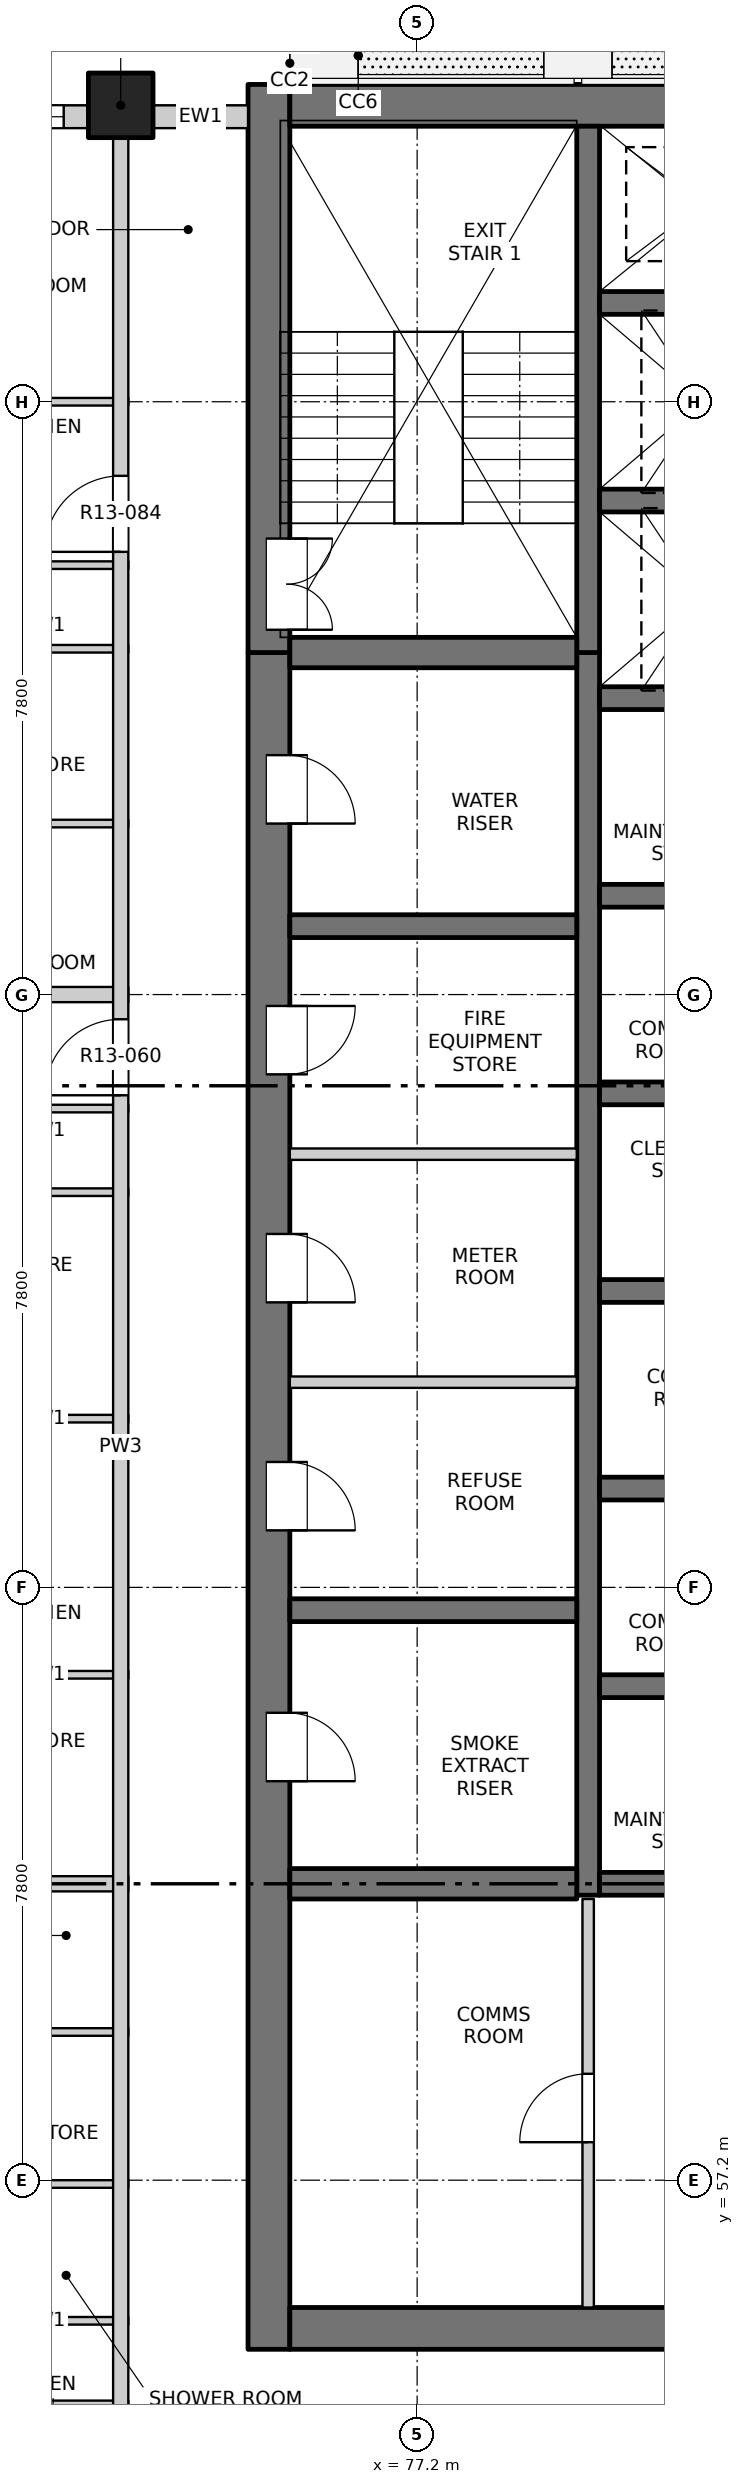
"""IFC4 building model, lengths in metres.
Left out: names, types, materials, properties, quantities, classifications, styles, units other than length and angle.
Written with IfcOpenShell. Run it as: python <this file> out.ifc"""

import sys

from ifc_helpers import new_model, si_unit, direction, frame, frame_2d, origin, origin_2d, place, context, subcontext, project, spatial, rectangle, extrude, element, fill, save


model = new_model("IFC4")
c1 = context("Model", 3, precision=1e-05, world=origin(), true_north=direction((0.0, 1.0)))
c2 = subcontext(c1, "Body", "Model", "MODEL_VIEW")
j1 = project(units=[si_unit("LENGTHUNIT", "METRE"), si_unit("PLANEANGLEUNIT", "RADIAN")], contexts=[c1])
p1 = place(None, origin())
s1 = spatial("IfcSite", under=j1, at=p1, CompositionType="ELEMENT")
p2 = place(p1, origin())
s2 = spatial("IfcBuilding", under=s1, at=p2, CompositionType="ELEMENT")
p3 = place(p2, frame((0.0, 0.0, 140.7)))
s3 = spatial("IfcBuildingStorey", under=s2, at=p3, CompositionType="ELEMENT", Elevation=140.7)
p4 = place(p3, frame((73.3, 84.5, -0.25), z_axis=(0.0, 0.0, 1.0), x_axis=(1.0, 0.0, 0.0)))
e1 = element("IfcColumn", 1, at=p4, inside=s3, PredefinedType="COLUMN", context=c2, shape_type="SweptSolid", body=[
    extrude(rectangle(XDim=0.85, YDim=0.85, at=origin_2d()), origin(), (0.0, 0.0, 1.0), 3.35),
])
p5 = place(p3, frame((75.25, 54.975, -0.25), z_axis=(0.0, 0.0, 1.0), x_axis=(0.0, 1.0, 0.0)))
e2 = element("IfcWall", 2, at=p5, inside=s3, PredefinedType="SOLIDWALL", context=c2, shape_type="SweptSolid", body=[
    extrude(rectangle(XDim=22.325, YDim=0.55, at=frame_2d((11.163, 0.0))), origin(), (0.0, 0.0, 1.0), 3.35),
])
p6 = place(p5, frame((7.475, 0.0, 0.25)))
e3 = element("IfcOpeningElement", 3, at=p6, cuts=e2, PredefinedType="OPENING", context=c2, shape_type="SweptSolid", body=[
    extrude(rectangle(XDim=0.9, YDim=2.1, at=frame_2d((0.45, 1.05))), frame((0.0, 0.285, 0.0), z_axis=(0.0, -1.0, 0.0), x_axis=(1.0, 0.0, 0.0)), (0.0, 0.0, 1.0), 0.57),
])
p7 = place(p5, frame((10.775, 0.0, 0.25)))
e4 = element("IfcOpeningElement", 4, at=p7, cuts=e2, PredefinedType="OPENING", context=c2, shape_type="SweptSolid", body=[
    extrude(rectangle(XDim=0.9, YDim=2.1, at=frame_2d((0.45, 1.05))), frame((0.0, 0.285, 0.0), z_axis=(0.0, -1.0, 0.0), x_axis=(1.0, 0.0, 0.0)), (0.0, 0.0, 1.0), 0.57),
])
p8 = place(p5, frame((13.775, 0.0, 0.25)))
e5 = element("IfcOpeningElement", 5, at=p8, cuts=e2, PredefinedType="OPENING", context=c2, shape_type="SweptSolid", body=[
    extrude(rectangle(XDim=0.9, YDim=2.1, at=frame_2d((0.45, 1.05))), frame((0.0, 0.285, 0.0), z_axis=(0.0, -1.0, 0.0), x_axis=(1.0, 0.0, 0.0)), (0.0, 0.0, 1.0), 0.57),
])
p9 = place(p5, frame((16.775, 0.0, 0.25)))
e6 = element("IfcOpeningElement", 6, at=p9, cuts=e2, PredefinedType="OPENING", context=c2, shape_type="SweptSolid", body=[
    extrude(rectangle(XDim=0.9, YDim=2.1, at=frame_2d((0.45, 1.05))), frame((0.0, 0.285, 0.0), z_axis=(0.0, -1.0, 0.0), x_axis=(1.0, 0.0, 0.0)), (0.0, 0.0, 1.0), 0.57),
])
p10 = place(p5, frame((20.075, 0.0, 0.25)))
e7 = element("IfcOpeningElement", 7, at=p10, cuts=e2, PredefinedType="OPENING", context=c2, shape_type="SweptSolid", body=[
    extrude(rectangle(XDim=0.9, YDim=2.1, at=frame_2d((0.45, 1.05))), frame((0.0, 0.285, 0.0), z_axis=(0.0, -1.0, 0.0), x_axis=(1.0, 0.0, 0.0)), (0.0, 0.0, 1.0), 0.57),
])
p11 = place(p3, frame((75.25, 77.3, -0.25), z_axis=(0.0, 0.0, 1.0), x_axis=(0.0, 1.0, 0.0)))
e8 = element("IfcWall", 8, at=p11, inside=s3, PredefinedType="SOLIDWALL", context=c2, shape_type="SweptSolid", body=[
    extrude(rectangle(XDim=7.475, YDim=0.55, at=frame_2d((3.737, 0.0))), origin(), (0.0, 0.0, 1.0), 3.35),
])
p12 = place(p11, frame((0.3, 0.0, 0.25)))
e9 = element("IfcOpeningElement", 9, at=p12, cuts=e8, PredefinedType="OPENING", context=c2, shape_type="SweptSolid", body=[
    extrude(rectangle(XDim=1.2, YDim=2.1, at=frame_2d((0.6, 1.05))), frame((0.0, 0.285, 0.0), z_axis=(0.0, -1.0, 0.0), x_axis=(1.0, 0.0, 0.0)), (0.0, 0.0, 1.0), 0.57),
])
p13 = place(p3, frame((75.525, 55.25, -0.25), z_axis=(0.0, 0.0, 1.0), x_axis=(1.0, 0.0, 0.0)))
e10 = element("IfcWall", 10, at=p13, inside=s3, PredefinedType="SOLIDWALL", context=c2, shape_type="SweptSolid", body=[
    extrude(rectangle(XDim=18.95, YDim=0.55, at=frame_2d((9.475, 0.0))), origin(), (0.0, 0.0, 1.0), 3.35),
])
p14 = place(p13, frame((8.725, 0.0, 0.25)))
e11 = element("IfcOpeningElement", 11, at=p14, cuts=e10, PredefinedType="OPENING", context=c2, shape_type="SweptSolid", body=[
    extrude(rectangle(XDim=1.5, YDim=2.1, at=frame_2d((0.75, 1.05))), frame((0.0, 0.285, 0.0), z_axis=(0.0, -1.0, 0.0), x_axis=(1.0, 0.0, 0.0)), (0.0, 0.0, 1.0), 0.57),
])
p15 = place(p3, frame((75.525, 84.5, -0.25), z_axis=(0.0, 0.0, 1.0), x_axis=(1.0, 0.0, 0.0)))
e12 = element("IfcWall", 12, at=p15, inside=s3, PredefinedType="SOLIDWALL", context=c2, shape_type="SweptSolid", body=[
    extrude(rectangle(XDim=18.95, YDim=0.55, at=frame_2d((9.475, 0.0))), origin(), (0.0, 0.0, 1.0), 3.35),
])
p16 = place(p3, frame((79.45, 60.95, -0.25), z_axis=(0.0, 0.0, 1.0), x_axis=(0.0, 1.0, 0.0)))
e13 = element("IfcWall", 13, at=p16, inside=s3, PredefinedType="SOLIDWALL", context=c2, shape_type="SweptSolid", body=[
    extrude(rectangle(XDim=16.35, YDim=0.3, at=frame_2d((8.175, 0.0))), origin(), (0.0, 0.0, 1.0), 3.35),
])
p17 = place(p3, frame((79.45, 77.3, -0.25), z_axis=(0.0, 0.0, 1.0), x_axis=(0.0, 1.0, 0.0)))
e14 = element("IfcWall", 14, at=p17, inside=s3, PredefinedType="SOLIDWALL", context=c2, shape_type="SweptSolid", body=[
    extrude(rectangle(XDim=6.925, YDim=0.3, at=frame_2d((3.462, 0.0))), origin(), (0.0, 0.0, 1.0), 3.35),
])
for number, where, z_axis, x_axis in (
    (15, (79.6, 61.1, -0.25), (0.0, 0.0, 1.0), (1.0, 0.0, 0.0)),
    (16, (79.6, 63.7, -0.25), (0.0, 0.0, 1.0), (1.0, 0.0, 0.0)),
    (17, (79.6, 66.3, -0.25), (0.0, 0.0, 1.0), (1.0, 0.0, 0.0)),
    (18, (79.6, 68.9, -0.25), (0.0, 0.0, 1.0), (1.0, 0.0, 0.0)),
    (19, (79.6, 71.5, -0.25), (0.0, 0.0, 1.0), (1.0, 0.0, 0.0)),
    (20, (79.6, 74.1, -0.25), (0.0, 0.0, 1.0), (1.0, 0.0, 0.0)),
    (21, (79.6, 76.7, -0.25), (0.0, 0.0, 1.0), (1.0, 0.0, 0.0)),
    (22, (79.6, 79.3, -0.25), (0.0, 0.0, 1.0), (1.0, 0.0, 0.0)),
    (23, (79.6, 81.9, -0.25), (0.0, 0.0, 1.0), (1.0, 0.0, 0.0)),
):
    element("IfcWall", number, at=place(p3, frame(where, z_axis=z_axis, x_axis=x_axis)), inside=s3, PredefinedType="SOLIDWALL", context=c2, shape_type="SweptSolid", body=[
        extrude(rectangle(XDim=3.0, YDim=0.3, at=frame_2d((1.5, 0.0))), origin(), (0.0, 0.0, 1.0), 3.35),
    ])
p18 = place(p3, frame((75.525, 61.1, -0.25), z_axis=(0.0, 0.0, 1.0), x_axis=(1.0, 0.0, 0.0)))
e24 = element("IfcWall", 24, at=p18, inside=s3, PredefinedType="SOLIDWALL", context=c2, shape_type="SweptSolid", body=[
    extrude(rectangle(XDim=3.775, YDim=0.4, at=frame_2d((1.888, 0.0))), origin(), (0.0, 0.0, 1.0), 3.35),
])
for number, where, z_axis, x_axis in (
    (25, (75.525, 64.7, -0.25), (0.0, 0.0, 1.0), (1.0, 0.0, 0.0)),
    (26, (75.525, 73.7, -0.25), (0.0, 0.0, 1.0), (1.0, 0.0, 0.0)),
):
    element("IfcWall", number, at=place(p3, frame(where, z_axis=z_axis, x_axis=x_axis)), inside=s3, PredefinedType="SOLIDWALL", context=c2, shape_type="SweptSolid", body=[
        extrude(rectangle(XDim=3.775, YDim=0.3, at=frame_2d((1.888, 0.0))), origin(), (0.0, 0.0, 1.0), 3.35),
    ])
p19 = place(p3, frame((75.525, 77.3, -0.25), z_axis=(0.0, 0.0, 1.0), x_axis=(1.0, 0.0, 0.0)))
e27 = element("IfcWall", 27, at=p19, inside=s3, PredefinedType="SOLIDWALL", context=c2, shape_type="SweptSolid", body=[
    extrude(rectangle(XDim=3.775, YDim=0.4, at=frame_2d((1.888, 0.0))), origin(), (0.0, 0.0, 1.0), 3.35),
])
p20 = place(p3, frame((69.4, 84.35, 0.0), z_axis=(0.0, 0.0, 1.0), x_axis=(1.0, 0.0, 0.0)))
e28 = element("IfcWall", 28, at=p20, inside=s3, PredefinedType="SOLIDWALL", context=c2, shape_type="SweptSolid", body=[
    extrude(rectangle(XDim=3.475, YDim=0.3, at=frame_2d((1.738, 0.0))), origin(), (0.0, 0.0, 1.0), 3.1),
])
p21 = place(p20, frame((0.75, 0.0, 0.9)))
e29 = element("IfcOpeningElement", 29, at=p21, cuts=e28, PredefinedType="OPENING", context=c2, shape_type="SweptSolid", body=[
    extrude(rectangle(XDim=2.4, YDim=1.8, at=frame_2d((1.2, 0.9))), frame((0.0, 0.16, 0.0), z_axis=(0.0, -1.0, 0.0), x_axis=(1.0, 0.0, 0.0)), (0.0, 0.0, 1.0), 0.32),
])
p22 = place(p3, frame((73.725, 84.35, 0.0), z_axis=(0.0, 0.0, 1.0), x_axis=(1.0, 0.0, 0.0)))
e30 = element("IfcWall", 30, at=p22, inside=s3, PredefinedType="SOLIDWALL", context=c2, shape_type="SweptSolid", body=[
    extrude(rectangle(XDim=1.25, YDim=0.3, at=frame_2d((0.625, 0.0))), origin(), (0.0, 0.0, 1.0), 3.1),
])
for number, where, z_axis, x_axis in (
    (31, (71.18, 54.25, 0.0), (0.0, 0.0, 1.0), (1.0, 0.0, 0.0)),
    (32, (71.18, 55.35, 0.0), (0.0, 0.0, 1.0), (1.0, 0.0, 0.0)),
    (33, (71.18, 57.15, 0.0), (0.0, 0.0, 1.0), (1.0, 0.0, 0.0)),
    (34, (71.18, 59.15, 0.0), (0.0, 0.0, 1.0), (1.0, 0.0, 0.0)),
):
    element("IfcWall", number, at=place(p3, frame(where, z_axis=z_axis, x_axis=x_axis)), inside=s3, PredefinedType="PARTITIONING", context=c2, shape_type="SweptSolid", body=[
        extrude(rectangle(XDim=2.22, YDim=0.1, at=frame_2d((1.11, 0.0))), origin(), (0.0, 0.0, 1.0), 3.1),
    ])
p23 = place(p3, frame((65.8, 61.1, 0.0), z_axis=(0.0, 0.0, 1.0), x_axis=(1.0, 0.0, 0.0)))
e35 = element("IfcWall", 35, at=p23, inside=s3, PredefinedType="PARTITIONING", context=c2, shape_type="SweptSolid", body=[
    extrude(rectangle(XDim=7.6, YDim=0.2, at=frame_2d((3.8, 0.0))), origin(), (0.0, 0.0, 1.0), 3.1),
])
for number, where, z_axis, x_axis in (
    (36, (71.18, 63.85, 0.0), (0.0, 0.0, 1.0), (1.0, 0.0, 0.0)),
    (37, (71.18, 67.22, 0.0), (0.0, 0.0, 1.0), (1.0, 0.0, 0.0)),
):
    element("IfcWall", number, at=place(p3, frame(where, z_axis=z_axis, x_axis=x_axis)), inside=s3, PredefinedType="PARTITIONING", context=c2, shape_type="SweptSolid", body=[
        extrude(rectangle(XDim=2.22, YDim=0.1, at=frame_2d((1.11, 0.0))), origin(), (0.0, 0.0, 1.0), 3.1),
    ])
p24 = place(p3, frame((75.525, 67.7, 0.0), z_axis=(0.0, 0.0, 1.0), x_axis=(1.0, 0.0, 0.0)))
e38 = element("IfcWall", 38, at=p24, inside=s3, PredefinedType="PARTITIONING", context=c2, shape_type="SweptSolid", body=[
    extrude(rectangle(XDim=3.775, YDim=0.15, at=frame_2d((1.887, 0.0))), origin(), (0.0, 0.0, 1.0), 3.1),
])
p25 = place(p3, frame((71.18, 70.2, 0.0), z_axis=(0.0, 0.0, 1.0), x_axis=(1.0, 0.0, 0.0)))
e39 = element("IfcWall", 39, at=p25, inside=s3, PredefinedType="PARTITIONING", context=c2, shape_type="SweptSolid", body=[
    extrude(rectangle(XDim=2.22, YDim=0.1, at=frame_2d((1.11, 0.0))), origin(), (0.0, 0.0, 1.0), 3.1),
])
p26 = place(p3, frame((75.525, 70.7, 0.0), z_axis=(0.0, 0.0, 1.0), x_axis=(1.0, 0.0, 0.0)))
e40 = element("IfcWall", 40, at=p26, inside=s3, PredefinedType="PARTITIONING", context=c2, shape_type="SweptSolid", body=[
    extrude(rectangle(XDim=3.775, YDim=0.15, at=frame_2d((1.887, 0.0))), origin(), (0.0, 0.0, 1.0), 3.1),
])
p27 = place(p3, frame((71.18, 71.3, 0.0), z_axis=(0.0, 0.0, 1.0), x_axis=(1.0, 0.0, 0.0)))
e41 = element("IfcWall", 41, at=p27, inside=s3, PredefinedType="PARTITIONING", context=c2, shape_type="SweptSolid", body=[
    extrude(rectangle(XDim=2.22, YDim=0.1, at=frame_2d((1.11, 0.0))), origin(), (0.0, 0.0, 1.0), 3.1),
])
p28 = place(p3, frame((65.8, 72.8, 0.0), z_axis=(0.0, 0.0, 1.0), x_axis=(1.0, 0.0, 0.0)))
e42 = element("IfcWall", 42, at=p28, inside=s3, PredefinedType="PARTITIONING", context=c2, shape_type="SweptSolid", body=[
    extrude(rectangle(XDim=7.6, YDim=0.2, at=frame_2d((3.8, 0.0))), origin(), (0.0, 0.0, 1.0), 3.1),
])
for number, where, z_axis, x_axis in (
    (43, (71.18, 75.05, 0.0), (0.0, 0.0, 1.0), (1.0, 0.0, 0.0)),
    (44, (71.18, 77.35, 0.0), (0.0, 0.0, 1.0), (1.0, 0.0, 0.0)),
    (45, (71.18, 78.45, 0.0), (0.0, 0.0, 1.0), (1.0, 0.0, 0.0)),
):
    element("IfcWall", number, at=place(p3, frame(where, z_axis=z_axis, x_axis=x_axis)), inside=s3, PredefinedType="PARTITIONING", context=c2, shape_type="SweptSolid", body=[
        extrude(rectangle(XDim=2.22, YDim=0.1, at=frame_2d((1.11, 0.0))), origin(), (0.0, 0.0, 1.0), 3.1),
    ])
p29 = place(p3, frame((65.8, 80.6, 0.0), z_axis=(0.0, 0.0, 1.0), x_axis=(1.0, 0.0, 0.0)))
e46 = element("IfcWall", 46, at=p29, inside=s3, PredefinedType="PARTITIONING", context=c2, shape_type="SweptSolid", body=[
    extrude(rectangle(XDim=7.6, YDim=0.1, at=frame_2d((3.8, 0.0))), origin(), (0.0, 0.0, 1.0), 3.1),
])
p30 = place(p29, frame((4.19, 0.0, 0.0)))
e47 = element("IfcOpeningElement", 47, at=p30, cuts=e46, PredefinedType="OPENING", context=c2, shape_type="SweptSolid", body=[
    extrude(rectangle(XDim=0.9, YDim=2.1, at=frame_2d((0.45, 1.05))), frame((0.0, 0.06, 0.0), z_axis=(0.0, -1.0, 0.0), x_axis=(1.0, 0.0, 0.0)), (0.0, 0.0, 1.0), 0.12),
])
p31 = place(p3, frame((73.3, 49.5, 0.0), z_axis=(0.0, 0.0, 1.0), x_axis=(0.0, 1.0, 0.0)))
e48 = element("IfcWall", 48, at=p31, inside=s3, PredefinedType="PARTITIONING", context=c2, shape_type="SweptSolid", body=[
    extrude(rectangle(XDim=34.7, YDim=0.2, at=frame_2d((17.35, 0.0))), origin(), (0.0, 0.0, 1.0), 3.1),
])
p32 = place(p31, frame((3.575, 0.0, 0.0)))
e49 = element("IfcOpeningElement", 49, at=p32, cuts=e48, PredefinedType="OPENING", context=c2, shape_type="SweptSolid", body=[
    extrude(rectangle(XDim=1.0, YDim=2.1, at=frame_2d((0.5, 1.05))), frame((0.0, 0.11, 0.0), z_axis=(0.0, -1.0, 0.0), x_axis=(1.0, 0.0, 0.0)), (0.0, 0.0, 1.0), 0.22),
])
p33 = place(p31, frame((21.975, 0.0, 0.0)))
e50 = element("IfcOpeningElement", 50, at=p33, cuts=e48, PredefinedType="OPENING", context=c2, shape_type="SweptSolid", body=[
    extrude(rectangle(XDim=1.0, YDim=2.1, at=frame_2d((0.5, 1.05))), frame((0.0, 0.11, 0.0), z_axis=(0.0, -1.0, 0.0), x_axis=(1.0, 0.0, 0.0)), (0.0, 0.0, 1.0), 0.22),
])
p34 = place(p31, frame((29.125, 0.0, 0.0)))
e51 = element("IfcOpeningElement", 51, at=p34, cuts=e48, PredefinedType="OPENING", context=c2, shape_type="SweptSolid", body=[
    extrude(rectangle(XDim=1.0, YDim=2.1, at=frame_2d((0.5, 1.05))), frame((0.0, 0.11, 0.0), z_axis=(0.0, -1.0, 0.0), x_axis=(1.0, 0.0, 0.0)), (0.0, 0.0, 1.0), 0.22),
])
p35 = place(p3, frame((79.45, 55.525, 0.0), z_axis=(0.0, 0.0, 1.0), x_axis=(0.0, 1.0, 0.0)))
e52 = element("IfcWall", 52, at=p35, inside=s3, PredefinedType="PARTITIONING", context=c2, shape_type="SweptSolid", body=[
    extrude(rectangle(XDim=5.375, YDim=0.15, at=frame_2d((2.688, 0.0))), origin(), (0.0, 0.0, 1.0), 3.1),
])
p36 = place(p35, frame((2.175, 0.0, 0.0)))
e53 = element("IfcOpeningElement", 53, at=p36, cuts=e52, PredefinedType="OPENING", context=c2, shape_type="SweptSolid", body=[
    extrude(rectangle(XDim=0.9, YDim=2.1, at=frame_2d((0.45, 1.05))), frame((0.0, 0.085, 0.0), z_axis=(0.0, -1.0, 0.0), x_axis=(1.0, 0.0, 0.0)), (0.0, 0.0, 1.0), 0.17),
])
p37 = place(p21, origin())
e54 = element("IfcWindow", 54, at=p37, inside=s3, PartitioningType="DOUBLE_PANEL_VERTICAL", PredefinedType="WINDOW", context=c2, shape_type="SweptSolid", body=[
    extrude(rectangle(XDim=2.4, YDim=1.8, at=frame_2d((1.2, 0.9))), frame((0.0, 0.03, 0.0), z_axis=(0.0, -1.0, 0.0), x_axis=(1.0, 0.0, 0.0)), (0.0, 0.0, 1.0), 0.06),
])
fill(e29, e54)
p38 = place(p36, origin())
e55 = element("IfcDoor", 55, at=p38, inside=s3, OperationType="SINGLE_SWING_LEFT", PredefinedType="DOOR", context=c2, shape_type="SweptSolid", body=[
    extrude(rectangle(XDim=0.9, YDim=2.1, at=frame_2d((0.45, 1.05))), frame((0.0, 0.025, 0.0), z_axis=(0.0, -1.0, 0.0), x_axis=(1.0, 0.0, 0.0)), (0.0, 0.0, 1.0), 0.05),
])
fill(e53, e55)
p39 = place(p6, origin())
e56 = element("IfcDoor", 56, at=p39, inside=s3, OperationType="SINGLE_SWING_RIGHT", PredefinedType="DOOR", context=c2, shape_type="SweptSolid", body=[
    extrude(rectangle(XDim=0.9, YDim=2.1, at=frame_2d((0.45, 1.05))), frame((0.0, -0.21, 0.0), z_axis=(0.0, -1.0, 0.0), x_axis=(1.0, 0.0, 0.0)), (0.0, 0.0, 1.0), 0.05),
])
fill(e3, e56)
p40 = place(p7, origin())
e57 = element("IfcDoor", 57, at=p40, inside=s3, OperationType="SINGLE_SWING_RIGHT", PredefinedType="DOOR", context=c2, shape_type="SweptSolid", body=[
    extrude(rectangle(XDim=0.9, YDim=2.1, at=frame_2d((0.45, 1.05))), frame((0.0, -0.21, 0.0), z_axis=(0.0, -1.0, 0.0), x_axis=(1.0, 0.0, 0.0)), (0.0, 0.0, 1.0), 0.05),
])
fill(e4, e57)
p41 = place(p8, origin())
e58 = element("IfcDoor", 58, at=p41, inside=s3, OperationType="SINGLE_SWING_RIGHT", PredefinedType="DOOR", context=c2, shape_type="SweptSolid", body=[
    extrude(rectangle(XDim=0.9, YDim=2.1, at=frame_2d((0.45, 1.05))), frame((0.0, -0.21, 0.0), z_axis=(0.0, -1.0, 0.0), x_axis=(1.0, 0.0, 0.0)), (0.0, 0.0, 1.0), 0.05),
])
fill(e5, e58)
p42 = place(p33, origin())
e59 = element("IfcDoor", 59, at=p42, inside=s3, OperationType="SINGLE_SWING_RIGHT", PredefinedType="DOOR", context=c2, shape_type="SweptSolid", body=[
    extrude(rectangle(XDim=1.0, YDim=2.1, at=frame_2d((0.5, 1.05))), frame((0.0, 0.025, 0.0), z_axis=(0.0, -1.0, 0.0), x_axis=(1.0, 0.0, 0.0)), (0.0, 0.0, 1.0), 0.05),
])
fill(e50, e59)
p43 = place(p9, origin())
e60 = element("IfcDoor", 60, at=p43, inside=s3, OperationType="SINGLE_SWING_LEFT", PredefinedType="DOOR", context=c2, shape_type="SweptSolid", body=[
    extrude(rectangle(XDim=0.9, YDim=2.1, at=frame_2d((0.45, 1.05))), frame((0.0, -0.21, 0.0), z_axis=(0.0, -1.0, 0.0), x_axis=(1.0, 0.0, 0.0)), (0.0, 0.0, 1.0), 0.05),
])
fill(e6, e60)
p44 = place(p10, origin())
e61 = element("IfcDoor", 61, at=p44, inside=s3, OperationType="SINGLE_SWING_RIGHT", PredefinedType="DOOR", context=c2, shape_type="SweptSolid", body=[
    extrude(rectangle(XDim=0.9, YDim=2.1, at=frame_2d((0.45, 1.05))), frame((0.0, -0.21, 0.0), z_axis=(0.0, -1.0, 0.0), x_axis=(1.0, 0.0, 0.0)), (0.0, 0.0, 1.0), 0.05),
])
fill(e7, e61)
p45 = place(p12, origin())
e62 = element("IfcDoor", 62, at=p45, inside=s3, OperationType="DOUBLE_DOOR_SINGLE_SWING", PredefinedType="DOOR", context=c2, shape_type="SweptSolid", body=[
    extrude(rectangle(XDim=1.2, YDim=2.1, at=frame_2d((0.6, 1.05))), frame((0.0, -0.21, 0.0), z_axis=(0.0, -1.0, 0.0), x_axis=(1.0, 0.0, 0.0)), (0.0, 0.0, 1.0), 0.05),
])
fill(e9, e62)
p46 = place(p34, origin())
e63 = element("IfcDoor", 63, at=p46, inside=s3, OperationType="SINGLE_SWING_RIGHT", PredefinedType="DOOR", context=c2, shape_type="SweptSolid", body=[
    extrude(rectangle(XDim=1.0, YDim=2.1, at=frame_2d((0.5, 1.05))), frame((0.0, 0.025, 0.0), z_axis=(0.0, -1.0, 0.0), x_axis=(1.0, 0.0, 0.0)), (0.0, 0.0, 1.0), 0.05),
])
fill(e51, e63)
save(model, sys.argv[1])
